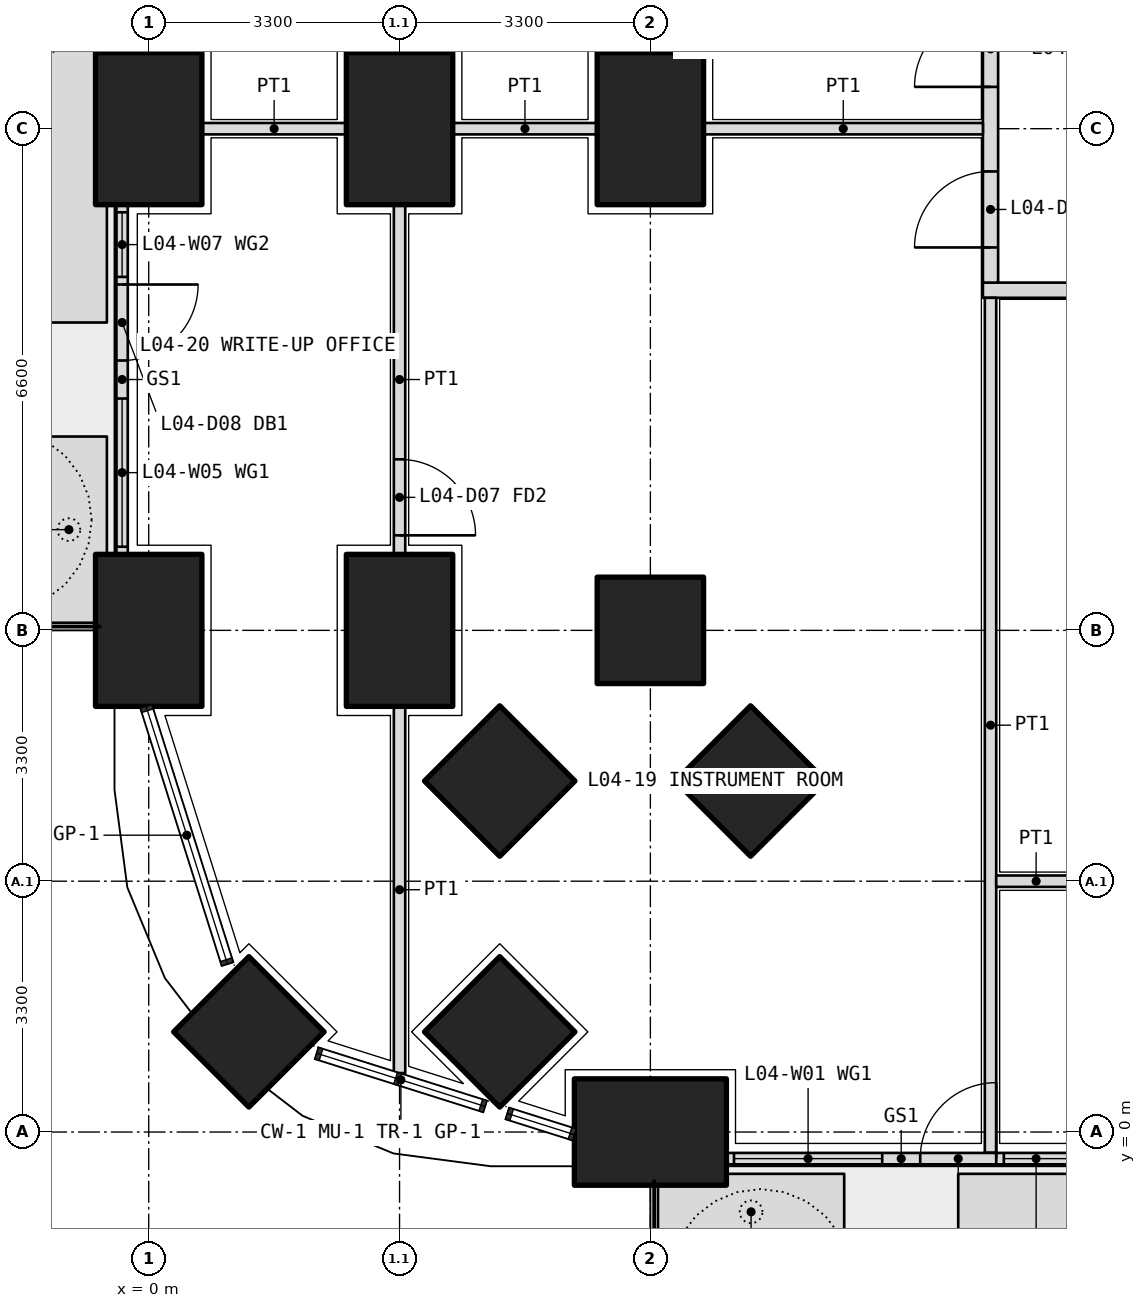
"""IFC4 building model, lengths in metres.
Left out: names, types, materials, properties, quantities, classifications, styles, units other than length and angle.
Written with IfcOpenShell. Run it as: python <this file> out.ifc"""

import sys

from ifc_helpers import new_model, si_unit, direction, frame, frame_2d, origin, origin_2d, place, context, subcontext, project, spatial, polyline, rectangle, outline, extrude, element, fill, save


model = new_model("IFC4")
c1 = context("Model", 3, precision=1e-05, world=origin(), true_north=direction((0.0, 1.0)))
c2 = subcontext(c1, "Body", "Model", "MODEL_VIEW")
j1 = project(units=[si_unit("LENGTHUNIT", "METRE"), si_unit("PLANEANGLEUNIT", "RADIAN")], contexts=[c1])
p1 = place(None, origin())
s1 = spatial("IfcSite", under=j1, at=p1, CompositionType="ELEMENT")
p2 = place(p1, origin())
s2 = spatial("IfcBuilding", under=s1, at=p2, CompositionType="ELEMENT")
p3 = place(p2, frame((0.0, 0.0, 21.3)))
s3 = spatial("IfcBuildingStorey", under=s2, at=p3, CompositionType="ELEMENT", Elevation=21.3)
p4 = place(p3, frame((1.318, 1.318, 0.0), z_axis=(0.0, 0.0, 1.0), x_axis=(0.707106781187, 0.707106781187, 0.0)))
e1 = element("IfcColumn", 1, at=p4, inside=s3, PredefinedType="COLUMN", context=c2, shape_type="SweptSolid", body=[
    extrude(rectangle(XDim=1.4, YDim=1.4, at=origin_2d()), origin(), (0.0, 0.0, 1.0), 4.2),
])
for number, where, z_axis, x_axis in (
    (2, (6.6, 0.0, 0.0), (0.0, 0.0, 1.0), (1.0, 0.0, 0.0)),
    (3, (0.0, 6.6, 0.0), (0.0, 0.0, 1.0), (0.0, 1.0, 0.0)),
    (4, (0.0, 13.2, 0.0), (0.0, 0.0, 1.0), (0.0, 1.0, 0.0)),
):
    element("IfcColumn", number, at=place(p3, frame(where, z_axis=z_axis, x_axis=x_axis)), inside=s3, PredefinedType="COLUMN", context=c2, shape_type="SweptSolid", body=[
        extrude(rectangle(XDim=2.0, YDim=1.4, at=origin_2d()), origin(), (0.0, 0.0, 1.0), 4.2),
    ])
for number, where, z_axis, x_axis in (
    (5, (6.6, 6.6, 0.0), (0.0, 0.0, 1.0), (1.0, 0.0, 0.0)),
    (6, (4.618, 1.318, 0.0), (0.0, 0.0, 1.0), (0.707, 0.707, 0.0)),
):
    element("IfcColumn", number, at=place(p3, frame(where, z_axis=z_axis, x_axis=x_axis)), inside=s3, PredefinedType="COLUMN", context=c2, shape_type="SweptSolid", body=[
        extrude(rectangle(XDim=1.4, YDim=1.4, at=origin_2d()), origin(), (0.0, 0.0, 1.0), 4.2),
    ])
for number, where, z_axis, x_axis in (
    (7, (3.3, 6.6, 0.0), (0.0, 0.0, 1.0), (0.0, 1.0, 0.0)),
    (8, (3.3, 13.2, 0.0), (0.0, 0.0, 1.0), (0.0, 1.0, 0.0)),
):
    element("IfcColumn", number, at=place(p3, frame(where, z_axis=z_axis, x_axis=x_axis)), inside=s3, PredefinedType="COLUMN", context=c2, shape_type="SweptSolid", body=[
        extrude(rectangle(XDim=2.0, YDim=1.4, at=origin_2d()), origin(), (0.0, 0.0, 1.0), 4.2),
    ])
for number, where, z_axis, x_axis in (
    (9, (4.618, 4.618, 0.0), (0.0, 0.0, 1.0), (0.707, 0.707, 0.0)),
    (10, (7.918, 4.618, 0.0), (0.0, 0.0, 1.0), (0.707, 0.707, 0.0)),
):
    element("IfcColumn", number, at=place(p3, frame(where, z_axis=z_axis, x_axis=x_axis)), inside=s3, PredefinedType="COLUMN", context=c2, shape_type="SweptSolid", body=[
        extrude(rectangle(XDim=1.4, YDim=1.4, at=origin_2d()), origin(), (0.0, 0.0, 1.0), 4.2),
    ])
p5 = place(p3, frame((6.6, 13.2, 0.0), z_axis=(0.0, 0.0, 1.0), x_axis=(0.0, 1.0, 0.0)))
e11 = element("IfcColumn", 11, at=p5, inside=s3, PredefinedType="COLUMN", context=c2, shape_type="SweptSolid", body=[
    extrude(rectangle(XDim=2.0, YDim=1.4, at=origin_2d()), origin(), (0.0, 0.0, 1.0), 4.2),
])
p6 = place(p3, origin())
e12 = element("IfcWall", 12, at=p6, inside=s3, PredefinedType="USERDEFINED", context=c2, shape_type="SweptSolid", body=[
    extrude(outline(polyline([(6.7, -1.55), (9.15, -1.55), (9.15, -0.55), (6.7, -0.55), (6.7, -1.55)]), holes=[polyline([(6.85, -1.4), (9.0, -1.4), (9.0, -0.7), (6.85, -0.7), (6.85, -1.4)])]), origin(), (0.0, 0.0, 1.0), 1.05),
])
p7 = place(p3, origin())
e13 = element("IfcWall", 13, at=p7, inside=s3, PredefinedType="USERDEFINED", context=c2, shape_type="SweptSolid", body=[
    extrude(outline(polyline([(10.65, -1.55), (19.7, -1.55), (19.7, -0.55), (10.65, -0.55), (10.65, -1.55)]), holes=[polyline([(10.8, -1.4), (19.55, -1.4), (19.55, -0.7), (10.8, -0.7), (10.8, -1.4)])]), origin(), (0.0, 0.0, 1.0), 1.05),
])
p8 = place(p3, origin())
e14 = element("IfcWall", 14, at=p8, inside=s3, PredefinedType="USERDEFINED", context=c2, shape_type="SweptSolid", body=[
    extrude(outline(polyline([(-1.55, 6.7), (-0.55, 6.7), (-0.55, 9.15), (-1.55, 9.15), (-1.55, 6.7)]), holes=[polyline([(-1.4, 6.85), (-0.7, 6.85), (-0.7, 9.0), (-1.4, 9.0), (-1.4, 6.85)])]), origin(), (0.0, 0.0, 1.0), 1.05),
])
p9 = place(p3, origin())
e15 = element("IfcWall", 15, at=p9, inside=s3, PredefinedType="USERDEFINED", context=c2, shape_type="SweptSolid", body=[
    extrude(outline(polyline([(-1.55, 10.65), (-0.55, 10.65), (-0.55, 19.7), (-1.55, 19.7), (-1.55, 10.65)]), holes=[polyline([(-1.4, 10.8), (-0.7, 10.8), (-0.7, 19.55), (-1.4, 19.55), (-1.4, 10.8)])]), origin(), (0.0, 0.0, 1.0), 1.05),
])
p10 = place(p3, frame((7.6, -0.35, 0.0), z_axis=(0.0, 0.0, 1.0), x_axis=(1.0, 0.0, 0.0)))
e16 = element("IfcWall", 16, at=p10, inside=s3, PredefinedType="SOLIDWALL", context=c2, shape_type="SweptSolid", body=[
    extrude(rectangle(XDim=4.6, YDim=0.15, at=frame_2d((2.3, 0.0))), origin(), (0.0, 0.0, 1.0), 2.7),
])
p11 = place(p10, frame((2.55, 0.0, 0.0)))
e17 = element("IfcOpeningElement", 17, at=p11, cuts=e16, PredefinedType="OPENING", context=c2, shape_type="SweptSolid", body=[
    extrude(rectangle(XDim=1.0, YDim=2.4, at=frame_2d((0.5, 1.2))), frame((0.0, 0.085, 0.0), z_axis=(0.0, -1.0, 0.0), x_axis=(1.0, 0.0, 0.0)), (0.0, 0.0, 1.0), 0.17),
])
p12 = place(p10, frame((0.1, 0.0, 0.1)))
e18 = element("IfcOpeningElement", 18, at=p12, cuts=e16, PredefinedType="OPENING", context=c2, shape_type="SweptSolid", body=[
    extrude(rectangle(XDim=1.95, YDim=2.3, at=frame_2d((0.975, 1.15))), frame((0.0, 0.085, 0.0), z_axis=(0.0, -1.0, 0.0), x_axis=(1.0, 0.0, 0.0)), (0.0, 0.0, 1.0), 0.17),
])
p13 = place(p10, frame((3.65, 0.0, 0.1)))
e19 = element("IfcOpeningElement", 19, at=p13, cuts=e16, PredefinedType="OPENING", context=c2, shape_type="SweptSolid", body=[
    extrude(rectangle(XDim=0.85, YDim=2.3, at=frame_2d((0.425, 1.15))), frame((0.0, 0.085, 0.0), z_axis=(0.0, -1.0, 0.0), x_axis=(1.0, 0.0, 0.0)), (0.0, 0.0, 1.0), 0.17),
])
p14 = place(p3, frame((-0.35, 12.2, 0.0), z_axis=(0.0, 0.0, 1.0), x_axis=(0.0, -1.0, 0.0)))
e20 = element("IfcWall", 20, at=p14, inside=s3, PredefinedType="SOLIDWALL", context=c2, shape_type="SweptSolid", body=[
    extrude(rectangle(XDim=4.6, YDim=0.15, at=frame_2d((2.3, 0.0))), origin(), (0.0, 0.0, 1.0), 2.7),
])
p15 = place(p14, frame((1.05, 0.0, 0.0)))
e21 = element("IfcOpeningElement", 21, at=p15, cuts=e20, PredefinedType="OPENING", context=c2, shape_type="SweptSolid", body=[
    extrude(rectangle(XDim=1.0, YDim=2.4, at=frame_2d((0.5, 1.2))), frame((0.0, 0.085, 0.0), z_axis=(0.0, -1.0, 0.0), x_axis=(1.0, 0.0, 0.0)), (0.0, 0.0, 1.0), 0.17),
])
p16 = place(p14, frame((0.1, 0.0, 0.1)))
e22 = element("IfcOpeningElement", 22, at=p16, cuts=e20, PredefinedType="OPENING", context=c2, shape_type="SweptSolid", body=[
    extrude(rectangle(XDim=0.85, YDim=2.3, at=frame_2d((0.425, 1.15))), frame((0.0, 0.085, 0.0), z_axis=(0.0, -1.0, 0.0), x_axis=(1.0, 0.0, 0.0)), (0.0, 0.0, 1.0), 0.17),
])
p17 = place(p14, frame((2.55, 0.0, 0.1)))
e23 = element("IfcOpeningElement", 23, at=p17, cuts=e20, PredefinedType="OPENING", context=c2, shape_type="SweptSolid", body=[
    extrude(rectangle(XDim=1.95, YDim=2.3, at=frame_2d((0.975, 1.15))), frame((0.0, 0.085, 0.0), z_axis=(0.0, -1.0, 0.0), x_axis=(1.0, 0.0, 0.0)), (0.0, 0.0, 1.0), 0.17),
])
p18 = place(p3, frame((10.975, 11.075, 0.0), z_axis=(0.0, 0.0, 1.0), x_axis=(1.0, 0.0, 0.0)))
e24 = element("IfcWall", 24, at=p18, inside=s3, PredefinedType="PARTITIONING", context=c2, shape_type="SweptSolid", body=[
    extrude(rectangle(XDim=18.725, YDim=0.2, at=frame_2d((9.362, 0.0))), origin(), (0.0, 0.0, 1.0), 2.85),
])
p19 = place(p18, frame((8.913, 0.0, 0.0)))
e25 = element("IfcOpeningElement", 25, at=p19, cuts=e24, PredefinedType="OPENING", context=c2, shape_type="SweptSolid", body=[
    extrude(rectangle(XDim=1.0, YDim=2.1, at=frame_2d((0.5, 1.05))), frame((0.0, 0.11, 0.0), z_axis=(0.0, -1.0, 0.0), x_axis=(1.0, 0.0, 0.0)), (0.0, 0.0, 1.0), 0.22),
])
p20 = place(p3, frame((11.075, 11.175, 0.0), z_axis=(0.0, 0.0, 1.0), x_axis=(0.0, 1.0, 0.0)))
e26 = element("IfcWall", 26, at=p20, inside=s3, PredefinedType="PARTITIONING", context=c2, shape_type="SweptSolid", body=[
    extrude(rectangle(XDim=23.85, YDim=0.2, at=frame_2d((11.925, 0.0))), origin(), (0.0, 0.0, 1.0), 2.85),
])
p21 = place(p20, frame((0.462, 0.0, 0.0)))
e27 = element("IfcOpeningElement", 27, at=p21, cuts=e26, PredefinedType="OPENING", context=c2, shape_type="SweptSolid", body=[
    extrude(rectangle(XDim=1.0, YDim=2.1, at=frame_2d((0.5, 1.05))), frame((0.0, 0.11, 0.0), z_axis=(0.0, -1.0, 0.0), x_axis=(1.0, 0.0, 0.0)), (0.0, 0.0, 1.0), 0.22),
])
p22 = place(p20, frame((2.575, 0.0, 0.0)))
e28 = element("IfcOpeningElement", 28, at=p22, cuts=e26, PredefinedType="OPENING", context=c2, shape_type="SweptSolid", body=[
    extrude(rectangle(XDim=1.0, YDim=2.1, at=frame_2d((0.5, 1.05))), frame((0.0, 0.11, 0.0), z_axis=(0.0, -1.0, 0.0), x_axis=(1.0, 0.0, 0.0)), (0.0, 0.0, 1.0), 0.22),
])
p23 = place(p20, frame((5.625, 0.0, 0.0)))
e29 = element("IfcOpeningElement", 29, at=p23, cuts=e26, PredefinedType="OPENING", context=c2, shape_type="SweptSolid", body=[
    extrude(rectangle(XDim=0.9, YDim=2.1, at=frame_2d((0.45, 1.05))), frame((0.0, 0.11, 0.0), z_axis=(0.0, -1.0, 0.0), x_axis=(1.0, 0.0, 0.0)), (0.0, 0.0, 1.0), 0.22),
])
p24 = place(p20, frame((9.425, 0.0, 0.0)))
e30 = element("IfcOpeningElement", 30, at=p24, cuts=e26, PredefinedType="OPENING", context=c2, shape_type="SweptSolid", body=[
    extrude(rectangle(XDim=0.9, YDim=2.1, at=frame_2d((0.45, 1.05))), frame((0.0, 0.11, 0.0), z_axis=(0.0, -1.0, 0.0), x_axis=(1.0, 0.0, 0.0)), (0.0, 0.0, 1.0), 0.22),
])
p25 = place(p20, frame((12.975, 0.0, 0.0)))
e31 = element("IfcOpeningElement", 31, at=p25, cuts=e26, PredefinedType="OPENING", context=c2, shape_type="SweptSolid", body=[
    extrude(rectangle(XDim=1.0, YDim=2.1, at=frame_2d((0.5, 1.05))), frame((0.0, 0.11, 0.0), z_axis=(0.0, -1.0, 0.0), x_axis=(1.0, 0.0, 0.0)), (0.0, 0.0, 1.0), 0.22),
])
p26 = place(p20, frame((16.375, 0.0, 0.0)))
e32 = element("IfcOpeningElement", 32, at=p26, cuts=e26, PredefinedType="OPENING", context=c2, shape_type="SweptSolid", body=[
    extrude(rectangle(XDim=1.0, YDim=2.1, at=frame_2d((0.5, 1.05))), frame((0.0, 0.11, 0.0), z_axis=(0.0, -1.0, 0.0), x_axis=(1.0, 0.0, 0.0)), (0.0, 0.0, 1.0), 0.22),
])
p27 = place(p20, frame((20.738, 0.0, 0.0)))
e33 = element("IfcOpeningElement", 33, at=p27, cuts=e26, PredefinedType="OPENING", context=c2, shape_type="SweptSolid", body=[
    extrude(rectangle(XDim=1.0, YDim=2.1, at=frame_2d((0.5, 1.05))), frame((0.0, 0.11, 0.0), z_axis=(0.0, -1.0, 0.0), x_axis=(1.0, 0.0, 0.0)), (0.0, 0.0, 1.0), 0.22),
])
p28 = place(p3, frame((11.075, -0.27, 0.0), z_axis=(0.0, 0.0, 1.0), x_axis=(0.0, 1.0, 0.0)))
e34 = element("IfcWall", 34, at=p28, inside=s3, PredefinedType="PARTITIONING", context=c2, shape_type="SweptSolid", body=[
    extrude(rectangle(XDim=11.245, YDim=0.15, at=frame_2d((5.623, 0.0))), origin(), (0.0, 0.0, 1.0), 2.7),
])
p29 = place(p3, frame((11.15, 3.3, 0.0), z_axis=(0.0, 0.0, 1.0), x_axis=(1.0, 0.0, 0.0)))
e35 = element("IfcWall", 35, at=p29, inside=s3, PredefinedType="PARTITIONING", context=c2, shape_type="SweptSolid", body=[
    extrude(rectangle(XDim=1.05, YDim=0.15, at=frame_2d((0.525, 0.0))), origin(), (0.0, 0.0, 1.0), 3.9),
])
p30 = place(p3, frame((3.3, 12.2, 0.0), z_axis=(0.0, 0.0, 1.0), x_axis=(0.0, -1.0, 0.0)))
e36 = element("IfcWall", 36, at=p30, inside=s3, PredefinedType="PARTITIONING", context=c2, shape_type="SweptSolid", body=[
    extrude(rectangle(XDim=4.6, YDim=0.15, at=frame_2d((2.3, 0.0))), origin(), (0.0, 0.0, 1.0), 3.9),
])
p31 = place(p30, frame((3.35, 0.0, 0.0)))
e37 = element("IfcOpeningElement", 37, at=p31, cuts=e36, PredefinedType="OPENING", context=c2, shape_type="SweptSolid", body=[
    extrude(rectangle(XDim=1.0, YDim=2.1, at=frame_2d((0.5, 1.05))), frame((0.0, 0.085, 0.0), z_axis=(0.0, -1.0, 0.0), x_axis=(1.0, 0.0, 0.0)), (0.0, 0.0, 1.0), 0.17),
])
p32 = place(p3, frame((3.3, 5.6, 0.0), z_axis=(0.0, 0.0, 1.0), x_axis=(0.0, -1.0, 0.0)))
e38 = element("IfcWall", 38, at=p32, inside=s3, PredefinedType="PARTITIONING", context=c2, shape_type="SweptSolid", body=[
    extrude(rectangle(XDim=4.824, YDim=0.15, at=frame_2d((2.412, 0.0))), origin(), (0.0, 0.0, 1.0), 2.7),
])
p33 = place(p3, frame((0.7, 13.2, 0.0), z_axis=(0.0, 0.0, 1.0), x_axis=(1.0, 0.0, 0.0)))
e39 = element("IfcWall", 39, at=p33, inside=s3, PredefinedType="PARTITIONING", context=c2, shape_type="SweptSolid", body=[
    extrude(rectangle(XDim=1.9, YDim=0.15, at=frame_2d((0.95, 0.0))), origin(), (0.0, 0.0, 1.0), 2.85),
])
p34 = place(p3, frame((4.0, 13.2, 0.0), z_axis=(0.0, 0.0, 1.0), x_axis=(1.0, 0.0, 0.0)))
e40 = element("IfcWall", 40, at=p34, inside=s3, PredefinedType="PARTITIONING", context=c2, shape_type="SweptSolid", body=[
    extrude(rectangle(XDim=1.9, YDim=0.15, at=frame_2d((0.95, 0.0))), origin(), (0.0, 0.0, 1.0), 2.85),
])
p35 = place(p3, frame((7.3, 13.2, 0.0), z_axis=(0.0, 0.0, 1.0), x_axis=(1.0, 0.0, 0.0)))
e41 = element("IfcWall", 41, at=p35, inside=s3, PredefinedType="PARTITIONING", context=c2, shape_type="SweptSolid", body=[
    extrude(rectangle(XDim=3.675, YDim=0.15, at=frame_2d((1.837, 0.0))), origin(), (0.0, 0.0, 1.0), 2.85),
])
p36 = place(p11, origin())
e42 = element("IfcDoor", 42, at=p36, inside=s3, OperationType="SINGLE_SWING_RIGHT", PredefinedType="DOOR", context=c2, shape_type="SweptSolid", body=[
    extrude(rectangle(XDim=1.0, YDim=2.4, at=frame_2d((0.5, 1.2))), frame((0.0, 0.025, 0.0), z_axis=(0.0, -1.0, 0.0), x_axis=(1.0, 0.0, 0.0)), (0.0, 0.0, 1.0), 0.05),
])
fill(e17, e42)
p37 = place(p12, origin())
e43 = element("IfcWindow", 43, at=p37, inside=s3, PartitioningType="SINGLE_PANEL", PredefinedType="WINDOW", context=c2, shape_type="SweptSolid", body=[
    extrude(rectangle(XDim=1.95, YDim=2.3, at=frame_2d((0.975, 1.15))), frame((0.0, 0.03, 0.0), z_axis=(0.0, -1.0, 0.0), x_axis=(1.0, 0.0, 0.0)), (0.0, 0.0, 1.0), 0.06),
])
fill(e18, e43)
p38 = place(p13, origin())
e44 = element("IfcWindow", 44, at=p38, inside=s3, PartitioningType="SINGLE_PANEL", PredefinedType="WINDOW", context=c2, shape_type="SweptSolid", body=[
    extrude(rectangle(XDim=0.85, YDim=2.3, at=frame_2d((0.425, 1.15))), frame((0.0, 0.03, 0.0), z_axis=(0.0, -1.0, 0.0), x_axis=(1.0, 0.0, 0.0)), (0.0, 0.0, 1.0), 0.06),
])
fill(e19, e44)
p39 = place(p15, origin())
e45 = element("IfcDoor", 45, at=p39, inside=s3, OperationType="SINGLE_SWING_LEFT", PredefinedType="DOOR", context=c2, shape_type="SweptSolid", body=[
    extrude(rectangle(XDim=1.0, YDim=2.4, at=frame_2d((0.5, 1.2))), frame((0.0, 0.025, 0.0), z_axis=(0.0, -1.0, 0.0), x_axis=(1.0, 0.0, 0.0)), (0.0, 0.0, 1.0), 0.05),
])
fill(e21, e45)
p40 = place(p16, origin())
e46 = element("IfcWindow", 46, at=p40, inside=s3, PartitioningType="SINGLE_PANEL", PredefinedType="WINDOW", context=c2, shape_type="SweptSolid", body=[
    extrude(rectangle(XDim=0.85, YDim=2.3, at=frame_2d((0.425, 1.15))), frame((0.0, 0.03, 0.0), z_axis=(0.0, -1.0, 0.0), x_axis=(1.0, 0.0, 0.0)), (0.0, 0.0, 1.0), 0.06),
])
fill(e22, e46)
p41 = place(p17, origin())
e47 = element("IfcWindow", 47, at=p41, inside=s3, PartitioningType="SINGLE_PANEL", PredefinedType="WINDOW", context=c2, shape_type="SweptSolid", body=[
    extrude(rectangle(XDim=1.95, YDim=2.3, at=frame_2d((0.975, 1.15))), frame((0.0, 0.03, 0.0), z_axis=(0.0, -1.0, 0.0), x_axis=(1.0, 0.0, 0.0)), (0.0, 0.0, 1.0), 0.06),
])
fill(e23, e47)
p42 = place(p21, origin())
e48 = element("IfcDoor", 48, at=p42, inside=s3, OperationType="SINGLE_SWING_LEFT", PredefinedType="DOOR", context=c2, shape_type="SweptSolid", body=[
    extrude(rectangle(XDim=1.0, YDim=2.1, at=frame_2d((0.5, 1.05))), frame((0.0, 0.025, 0.0), z_axis=(0.0, -1.0, 0.0), x_axis=(1.0, 0.0, 0.0)), (0.0, 0.0, 1.0), 0.05),
])
fill(e27, e48)
p43 = place(p31, origin())
e49 = element("IfcDoor", 49, at=p43, inside=s3, OperationType="SINGLE_SWING_RIGHT", PredefinedType="DOOR", context=c2, shape_type="SweptSolid", body=[
    extrude(rectangle(XDim=1.0, YDim=2.1, at=frame_2d((0.5, 1.05))), frame((0.0, 0.025, 0.0), z_axis=(0.0, -1.0, 0.0), x_axis=(1.0, 0.0, 0.0)), (0.0, 0.0, 1.0), 0.05),
])
fill(e37, e49)
p44 = place(p22, origin())
e50 = element("IfcDoor", 50, at=p44, inside=s3, OperationType="SINGLE_SWING_LEFT", PredefinedType="DOOR", context=c2, shape_type="SweptSolid", body=[
    extrude(rectangle(XDim=1.0, YDim=2.1, at=frame_2d((0.5, 1.05))), frame((0.0, 0.025, 0.0), z_axis=(0.0, -1.0, 0.0), x_axis=(1.0, 0.0, 0.0)), (0.0, 0.0, 1.0), 0.05),
])
fill(e28, e50)
save(model, sys.argv[1])
